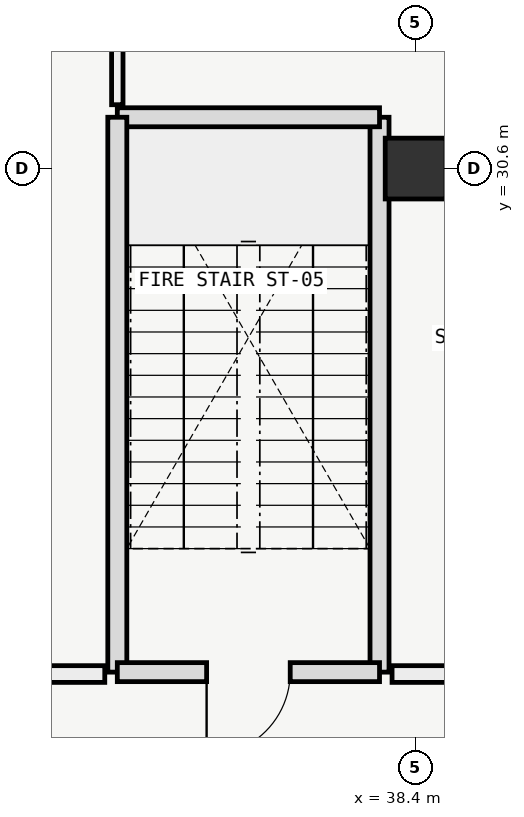
"""IFC4 building model, lengths in metres.
Left out: names, types, materials, properties, quantities, classifications, styles, units other than length and angle.
Written with IfcOpenShell. Run it as: python <this file> out.ifc"""

import sys

from ifc_helpers import new_model, si_unit, direction, frame, frame_2d, origin, origin_2d, place, context, subcontext, project, spatial, rectangle, extrude, element, fill, save


model = new_model("IFC4")
c1 = context("Model", 3, precision=1e-05, world=origin(), true_north=direction((0.0, 1.0)))
c2 = subcontext(c1, "Body", "Model", "MODEL_VIEW")
j1 = project(units=[si_unit("LENGTHUNIT", "METRE"), si_unit("PLANEANGLEUNIT", "RADIAN")], contexts=[c1])
p1 = place(None, origin())
s1 = spatial("IfcSite", under=j1, at=p1, CompositionType="ELEMENT")
p2 = place(p1, origin())
s2 = spatial("IfcBuilding", under=s1, at=p2, CompositionType="ELEMENT")
p3 = place(p2, origin())
s3 = spatial("IfcBuildingStorey", under=s2, at=p3, CompositionType="ELEMENT", Elevation=0.0)
p4 = place(p3, frame((38.4, 30.6, 0.0), z_axis=(0.0, 0.0, 1.0), x_axis=(1.0, 0.0, 0.0)))
e1 = element("IfcColumn", 1, at=p4, inside=s3, PredefinedType="COLUMN", context=c2, shape_type="SweptSolid", body=[
    extrude(rectangle(XDim=0.8, YDim=0.8, at=origin_2d()), origin(), (0.0, 0.0, 1.0), 5.4),
])
p5 = place(p3, frame((37.925, 23.975, 0.0), z_axis=(0.0, 0.0, 1.0), x_axis=(0.0, 1.0, 0.0)))
e2 = element("IfcWall", 2, at=p5, inside=s3, PredefinedType="SOLIDWALL", context=c2, shape_type="SweptSolid", body=[
    extrude(rectangle(XDim=7.3, YDim=0.25, at=frame_2d((3.65, 0.0))), origin(), (0.0, 0.0, 1.0), 5.12),
])
p6 = place(p3, frame((37.925, 31.275, 0.0), z_axis=(0.0, 0.0, 1.0), x_axis=(-1.0, 0.0, 0.0)))
e3 = element("IfcWall", 3, at=p6, inside=s3, PredefinedType="SOLIDWALL", context=c2, shape_type="SweptSolid", body=[
    extrude(rectangle(XDim=3.45, YDim=0.25, at=frame_2d((1.725, 0.0))), origin(), (0.0, 0.0, 1.0), 5.12),
])
p7 = place(p3, frame((34.475, 31.275, 0.0), z_axis=(0.0, 0.0, 1.0), x_axis=(0.0, -1.0, 0.0)))
e4 = element("IfcWall", 4, at=p7, inside=s3, PredefinedType="SOLIDWALL", context=c2, shape_type="SweptSolid", body=[
    extrude(rectangle(XDim=7.3, YDim=0.25, at=frame_2d((3.65, 0.0))), origin(), (0.0, 0.0, 1.0), 5.12),
])
p8 = place(p3, frame((37.925, 23.975, 0.0), z_axis=(0.0, 0.0, 1.0), x_axis=(-1.0, 0.0, 0.0)))
e5 = element("IfcWall", 5, at=p8, inside=s3, PredefinedType="SOLIDWALL", context=c2, shape_type="SweptSolid", body=[
    extrude(rectangle(XDim=3.45, YDim=0.25, at=frame_2d((1.725, 0.0))), origin(), (0.0, 0.0, 1.0), 5.12),
])
p9 = place(p8, frame((1.175, 0.0, 0.0)))
e6 = element("IfcOpeningElement", 6, at=p9, cuts=e5, PredefinedType="OPENING", context=c2, shape_type="SweptSolid", body=[
    extrude(rectangle(XDim=1.1, YDim=2.2, at=frame_2d((0.55, 1.1))), frame((0.0, 0.135, 0.0), z_axis=(0.0, -1.0, 0.0), x_axis=(1.0, 0.0, 0.0)), (0.0, 0.0, 1.0), 0.27),
])
p10 = place(p3, frame((27.325, 23.95, 0.0), z_axis=(0.0, 0.0, 1.0), x_axis=(1.0, 0.0, 0.0)))
e7 = element("IfcWall", 7, at=p10, inside=s3, PredefinedType="PARTITIONING", context=c2, shape_type="SweptSolid", body=[
    extrude(rectangle(XDim=6.985, YDim=0.22, at=frame_2d((3.493, 0.0))), origin(), (0.0, 0.0, 1.0), 4.45),
])
p11 = place(p10, frame((4.1, 0.0, 0.0)))
e8 = element("IfcOpeningElement", 8, at=p11, cuts=e7, PredefinedType="OPENING", context=c2, shape_type="SweptSolid", body=[
    extrude(rectangle(XDim=1.5, YDim=2.2, at=frame_2d((0.75, 1.1))), frame((0.0, 0.12, 0.0), z_axis=(0.0, -1.0, 0.0), x_axis=(1.0, 0.0, 0.0)), (0.0, 0.0, 1.0), 0.24),
])
p12 = place(p3, frame((34.475, 31.44, 0.0), z_axis=(0.0, 0.0, 1.0), x_axis=(0.0, 1.0, 0.0)))
e9 = element("IfcWall", 9, at=p12, inside=s3, PredefinedType="PARTITIONING", context=c2, shape_type="SweptSolid", body=[
    extrude(rectangle(XDim=9.21, YDim=0.15, at=frame_2d((4.605, 0.0))), origin(), (0.0, 0.0, 1.0), 4.6),
])
p13 = place(p3, frame((38.09, 23.95, 0.0), z_axis=(0.0, 0.0, 1.0), x_axis=(1.0, 0.0, 0.0)))
e10 = element("IfcWall", 10, at=p13, inside=s3, PredefinedType="PARTITIONING", context=c2, shape_type="SweptSolid", body=[
    extrude(rectangle(XDim=9.76, YDim=0.22, at=frame_2d((4.88, 0.0))), origin(), (0.0, 0.0, 1.0), 4.45),
])
p14 = place(p13, frame((3.235, 0.0, 0.0)))
e11 = element("IfcOpeningElement", 11, at=p14, cuts=e10, PredefinedType="OPENING", context=c2, shape_type="SweptSolid", body=[
    extrude(rectangle(XDim=0.95, YDim=2.1, at=frame_2d((0.475, 1.05))), frame((0.0, 0.12, 0.0), z_axis=(0.0, -1.0, 0.0), x_axis=(1.0, 0.0, 0.0)), (0.0, 0.0, 1.0), 0.24),
])
p15 = place(p9, origin())
e12 = element("IfcDoor", 12, at=p15, inside=s3, OperationType="SINGLE_SWING_RIGHT", PredefinedType="DOOR", context=c2, shape_type="SweptSolid", body=[
    extrude(rectangle(XDim=1.1, YDim=2.2, at=frame_2d((0.55, 1.1))), frame((0.0, 0.025, 0.0), z_axis=(0.0, -1.0, 0.0), x_axis=(1.0, 0.0, 0.0)), (0.0, 0.0, 1.0), 0.05),
])
fill(e6, e12)
save(model, sys.argv[1])
